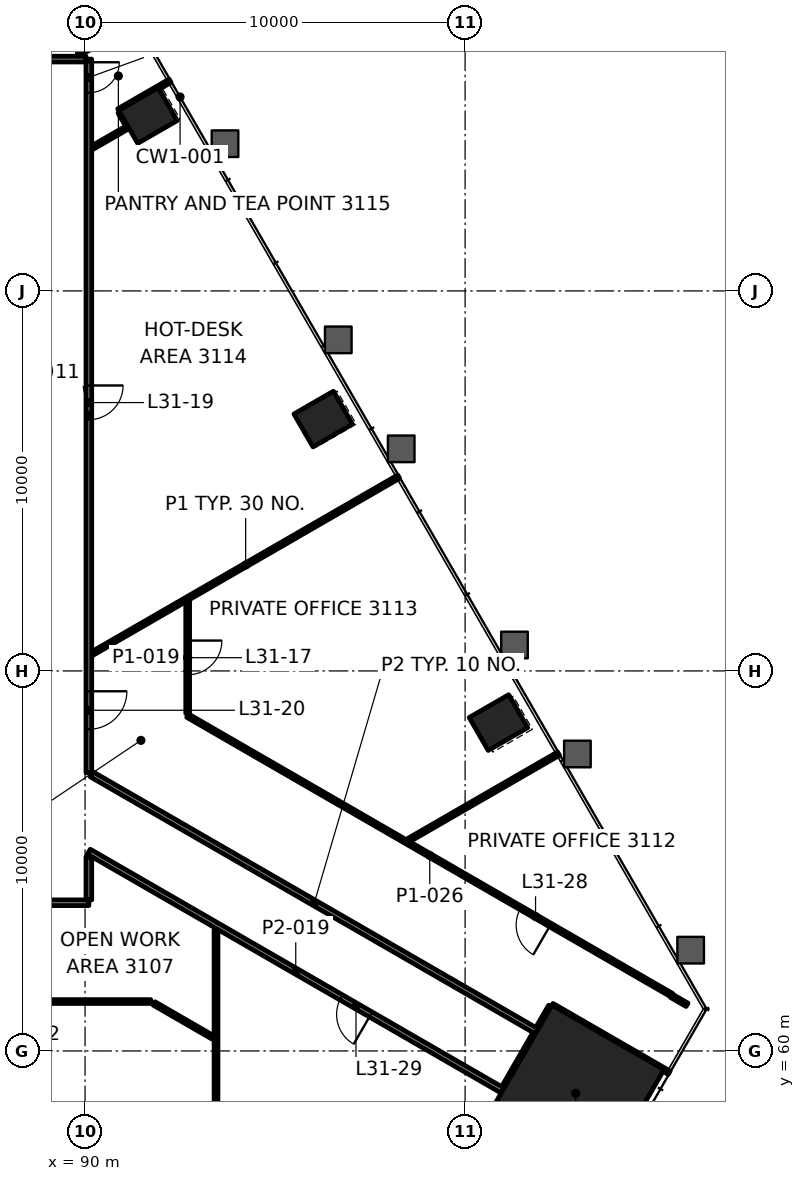
"""IFC4 building model, lengths in metres.
Left out: names, types, materials, properties, quantities, classifications, styles, units other than length and angle.
Written with IfcOpenShell. Run it as: python <this file> out.ifc"""

import sys

from ifc_helpers import new_model, si_unit, direction, frame, frame_2d, origin, origin_2d, place, context, subcontext, project, spatial, rectangle, extrude, element, fill, save


model = new_model("IFC4")
c1 = context("Model", 3, precision=1e-05, world=origin(), true_north=direction((0.0, 1.0)))
c2 = subcontext(c1, "Body", "Model", "MODEL_VIEW")
j1 = project(units=[si_unit("LENGTHUNIT", "METRE"), si_unit("PLANEANGLEUNIT", "RADIAN")], contexts=[c1])
p1 = place(None, origin())
s1 = spatial("IfcSite", under=j1, at=p1, CompositionType="ELEMENT")
p2 = place(p1, origin())
s2 = spatial("IfcBuilding", under=s1, at=p2, CompositionType="ELEMENT")
p3 = place(p2, frame((0.0, 0.0, 136.6)))
s3 = spatial("IfcBuildingStorey", under=s2, at=p3, CompositionType="ELEMENT", Elevation=136.6)
p4 = place(p3, frame((102.911, 58.886, 0.0), z_axis=(0.0, 0.0, 1.0), x_axis=(0.5, 0.866025403784, 0.0)))
e1 = element("IfcColumn", 1, at=p4, inside=s3, PredefinedType="COLUMN", context=c2, shape_type="SweptSolid", body=[
    extrude(rectangle(XDim=3.4, YDim=3.4, at=origin_2d()), origin(), (0.0, 0.0, 1.0), 4.2),
])
for number, where, z_axis, x_axis in (
    (2, (100.878, 68.641, -0.0), (0.0, 0.0, 1.0), (-0.5, 0.866, 0.0)),
    (3, (96.267, 76.628, -0.0), (0.0, 0.0, 1.0), (-0.5, 0.866, 0.0)),
    (4, (91.655, 84.616, -0.0), (0.0, 0.0, 1.0), (-0.5, 0.866, 0.0)),
):
    element("IfcColumn", number, at=place(p3, frame(where, z_axis=z_axis, x_axis=x_axis)), inside=s3, PredefinedType="COLUMN", context=c2, shape_type="SweptSolid", body=[
        extrude(rectangle(XDim=1.0, YDim=1.2, at=origin_2d()), origin(), (0.0, 0.0, 1.0), 4.2),
    ])
p5 = place(p3, frame((77.306, 61.3, 0.0), z_axis=(0.0, 0.0, 1.0), x_axis=(1.0, 0.0, 0.0)))
e5 = element("IfcWall", 5, at=p5, inside=s3, PredefinedType="PARTITIONING", context=c2, shape_type="SweptSolid", body=[
    extrude(rectangle(XDim=14.423, YDim=0.1, at=frame_2d((7.211, 0.0))), origin(), (0.0, 0.0, 1.0), 3.3),
])
p6 = place(p5, frame((3.687, 0.0, 0.0)))
e6 = element("IfcOpeningElement", 6, at=p6, cuts=e5, PredefinedType="OPENING", context=c2, shape_type="SweptSolid", body=[
    extrude(rectangle(XDim=0.9, YDim=2.1, at=frame_2d((0.45, 1.05))), frame((0.0, 0.06, 0.0), z_axis=(0.0, -1.0, 0.0), x_axis=(1.0, 0.0, 0.0)), (0.0, 0.0, 1.0), 0.12),
])
p7 = place(p5, frame((10.695, 0.0, 0.0)))
e7 = element("IfcOpeningElement", 7, at=p7, cuts=e5, PredefinedType="OPENING", context=c2, shape_type="SweptSolid", body=[
    extrude(rectangle(XDim=0.9, YDim=2.1, at=frame_2d((0.45, 1.05))), frame((0.0, 0.06, 0.0), z_axis=(0.0, -1.0, 0.0), x_axis=(1.0, 0.0, 0.0)), (0.0, 0.0, 1.0), 0.12),
])
p8 = place(p3, frame((90.1, 63.9, 0.0), z_axis=(0.0, 0.0, 1.0), x_axis=(-1.0, 0.0, 0.0)))
e8 = element("IfcWall", 8, at=p8, inside=s3, PredefinedType="PARTITIONING", context=c2, shape_type="SweptSolid", body=[
    extrude(rectangle(XDim=30.199, YDim=0.15, at=frame_2d((15.1, 0.0))), origin(), (0.0, 0.0, 1.0), 3.3),
])
p9 = place(p8, frame((5.999, 0.0, 0.0)))
e9 = element("IfcOpeningElement", 9, at=p9, cuts=e8, PredefinedType="OPENING", context=c2, shape_type="SweptSolid", body=[
    extrude(rectangle(XDim=1.0, YDim=2.1, at=frame_2d((0.5, 1.05))), frame((0.0, 0.085, 0.0), z_axis=(0.0, -1.0, 0.0), x_axis=(1.0, 0.0, 0.0)), (0.0, 0.0, 1.0), 0.17),
])
p10 = place(p8, frame((20.795, 0.0, 0.0)))
e10 = element("IfcOpeningElement", 10, at=p10, cuts=e8, PredefinedType="OPENING", context=c2, shape_type="SweptSolid", body=[
    extrude(rectangle(XDim=1.2, YDim=2.1, at=frame_2d((0.6, 1.05))), frame((0.0, 0.085, 0.0), z_axis=(0.0, -1.0, 0.0), x_axis=(1.0, 0.0, 0.0)), (0.0, 0.0, 1.0), 0.17),
])
p11 = place(p3, frame((80.375, 86.1, 0.0), z_axis=(0.0, 0.0, 1.0), x_axis=(1.0, 0.0, 0.0)))
e11 = element("IfcWall", 11, at=p11, inside=s3, PredefinedType="PARTITIONING", context=c2, shape_type="SweptSolid", body=[
    extrude(rectangle(XDim=9.65, YDim=0.15, at=frame_2d((4.825, 0.0))), origin(), (0.0, 0.0, 1.0), 3.3),
])
p12 = place(p11, frame((1.967, 0.0, 0.0)))
e12 = element("IfcOpeningElement", 12, at=p12, cuts=e11, PredefinedType="OPENING", context=c2, shape_type="SweptSolid", body=[
    extrude(rectangle(XDim=0.9, YDim=2.1, at=frame_2d((0.45, 1.05))), frame((0.0, 0.085, 0.0), z_axis=(0.0, -1.0, 0.0), x_axis=(1.0, 0.0, 0.0)), (0.0, 0.0, 1.0), 0.17),
])
p13 = place(p11, frame((6.485, 0.0, 0.0)))
e13 = element("IfcOpeningElement", 13, at=p13, cuts=e11, PredefinedType="OPENING", context=c2, shape_type="SweptSolid", body=[
    extrude(rectangle(XDim=0.9, YDim=2.1, at=frame_2d((0.45, 1.05))), frame((0.0, 0.085, 0.0), z_axis=(0.0, -1.0, 0.0), x_axis=(1.0, 0.0, 0.0)), (0.0, 0.0, 1.0), 0.17),
])
p14 = place(p3, frame((98.52, 65.55, 0.0), z_axis=(0.0, 0.0, 1.0), x_axis=(0.866021092682, 0.500007466975, 0.0)))
e14 = element("IfcWall", 14, at=p14, inside=s3, PredefinedType="PARTITIONING", context=c2, shape_type="SweptSolid", body=[
    extrude(rectangle(XDim=4.548, YDim=0.1, at=frame_2d((2.274, 0.0))), origin(), (0.0, 0.0, 1.0), 3.3),
])
p15 = place(p3, frame((90.201, 70.464, 0.0), z_axis=(0.0, 0.0, 1.0), x_axis=(0.8660316334, 0.499989209833, 0.0)))
e15 = element("IfcWall", 15, at=p15, inside=s3, PredefinedType="PARTITIONING", context=c2, shape_type="SweptSolid", body=[
    extrude(rectangle(XDim=9.296, YDim=0.1, at=frame_2d((4.648, 0.0))), origin(), (0.0, 0.0, 1.0), 3.065),
])
p16 = place(p3, frame((90.201, 83.776, 0.0), z_axis=(0.0, 0.0, 1.0), x_axis=(0.866034889475, 0.499983569942, 0.0)))
e16 = element("IfcWall", 16, at=p16, inside=s3, PredefinedType="PARTITIONING", context=c2, shape_type="SweptSolid", body=[
    extrude(rectangle(XDim=1.079, YDim=0.1, at=frame_2d((0.54, 0.0))), origin(), (0.0, 0.0, 1.0), 3.3),
])
p17 = place(p3, frame((90.885, 84.749, 0.0), z_axis=(0.0, 0.0, 1.0), x_axis=(0.866029224906, 0.499993381564, 0.0)))
e17 = element("IfcWall", 17, at=p17, inside=s3, PredefinedType="PARTITIONING", context=c2, shape_type="SweptSolid", body=[
    extrude(rectangle(XDim=1.56, YDim=0.1, at=frame_2d((0.78, 0.0))), origin(), (0.0, 0.0, 1.0), 3.065),
])
p18 = place(p3, frame((89.822, 86.22, 0.0), z_axis=(0.0, 0.0, 1.0), x_axis=(0.866022549299, 0.50000494408, 0.0)))
e18 = element("IfcWall", 18, at=p18, inside=s3, PredefinedType="PARTITIONING", context=c2, shape_type="SweptSolid", body=[
    extrude(rectangle(XDim=1.746, YDim=0.1, at=frame_2d((0.873, 0.0))), origin(), (0.0, 0.0, 1.0), 3.065),
])
p19 = place(p3, frame((85.211, 86.219, 0.0), z_axis=(0.0, 0.0, 1.0), x_axis=(0.866012033619, 0.50002315709, 0.0)))
e19 = element("IfcWall", 19, at=p19, inside=s3, PredefinedType="PARTITIONING", context=c2, shape_type="SweptSolid", body=[
    extrude(rectangle(XDim=5.74, YDim=0.1, at=frame_2d((2.87, 0.0))), origin(), (0.0, 0.0, 1.0), 3.065),
])
p20 = place(p3, frame((101.026, 59.022, 0.0), z_axis=(0.0, 0.0, 1.0), x_axis=(0.499991515992, 0.866030301974, 0.0)))
e20 = element("IfcWall", 20, at=p20, inside=s3, PredefinedType="PARTITIONING", context=c2, shape_type="SweptSolid", body=[
    extrude(rectangle(XDim=1.649, YDim=0.15, at=frame_2d((0.825, 0.0))), origin(), (0.0, 0.0, 1.0), 3.147),
])
p21 = place(p3, frame((93.446, 56.369, 0.0), z_axis=(0.0, 0.0, 1.0), x_axis=(0.0, 1.0, 0.0)))
e21 = element("IfcWall", 21, at=p21, inside=s3, PredefinedType="PARTITIONING", context=c2, shape_type="SweptSolid", body=[
    extrude(rectangle(XDim=6.825, YDim=0.1, at=frame_2d((3.413, 0.0))), origin(), (0.0, 0.0, 1.0), 3.3),
])
p22 = place(p3, frame((92.7, 71.818, 0.0), z_axis=(0.0, 0.0, 1.0), x_axis=(0.0, -1.0, 0.0)))
e22 = element("IfcWall", 22, at=p22, inside=s3, PredefinedType="PARTITIONING", context=c2, shape_type="SweptSolid", body=[
    extrude(rectangle(XDim=2.938, YDim=0.1, at=frame_2d((1.469, 0.0))), origin(), (0.0, 0.0, 1.0), 3.3),
])
p23 = place(p22, frame((1.019, 0.0, 0.0)))
e23 = element("IfcOpeningElement", 23, at=p23, cuts=e22, PredefinedType="OPENING", context=c2, shape_type="SweptSolid", body=[
    extrude(rectangle(XDim=0.9, YDim=2.1, at=frame_2d((0.45, 1.05))), frame((0.0, 0.06, 0.0), z_axis=(0.0, -1.0, 0.0), x_axis=(1.0, 0.0, 0.0)), (0.0, 0.0, 1.0), 0.12),
])
p24 = place(p3, frame((90.1, 63.975, 0.0), z_axis=(0.0, 0.0, 1.0), x_axis=(0.0, 1.0, 0.0)))
e24 = element("IfcWall", 24, at=p24, inside=s3, PredefinedType="PARTITIONING", context=c2, shape_type="SweptSolid", body=[
    extrude(rectangle(XDim=1.131, YDim=0.15, at=frame_2d((0.565, 0.0))), origin(), (0.0, 0.0, 1.0), 3.147),
])
p25 = place(p3, frame((90.1, 86.1, 0.0), z_axis=(0.0, 0.0, 1.0), x_axis=(0.0, -1.0, 0.0)))
e25 = element("IfcWall", 25, at=p25, inside=s3, PredefinedType="PARTITIONING", context=c2, shape_type="SweptSolid", body=[
    extrude(rectangle(XDim=18.779, YDim=0.15, at=frame_2d((9.389, 0.0))), origin(), (0.0, 0.0, 1.0), 3.3),
])
p26 = place(p25, frame((0.083, 0.0, 0.0)))
e26 = element("IfcOpeningElement", 26, at=p26, cuts=e25, PredefinedType="OPENING", context=c2, shape_type="SweptSolid", body=[
    extrude(rectangle(XDim=0.8, YDim=2.1, at=frame_2d((0.4, 1.05))), frame((0.0, 0.085, 0.0), z_axis=(0.0, -1.0, 0.0), x_axis=(1.0, 0.0, 0.0)), (0.0, 0.0, 1.0), 0.17),
])
p27 = place(p25, frame((8.588, 0.0, 0.0)))
e27 = element("IfcOpeningElement", 27, at=p27, cuts=e25, PredefinedType="OPENING", context=c2, shape_type="SweptSolid", body=[
    extrude(rectangle(XDim=0.9, YDim=2.1, at=frame_2d((0.45, 1.05))), frame((0.0, 0.085, 0.0), z_axis=(0.0, -1.0, 0.0), x_axis=(1.0, 0.0, 0.0)), (0.0, 0.0, 1.0), 0.17),
])
p28 = place(p25, frame((16.635, 0.0, 0.0)))
e28 = element("IfcOpeningElement", 28, at=p28, cuts=e25, PredefinedType="OPENING", context=c2, shape_type="SweptSolid", body=[
    extrude(rectangle(XDim=1.0, YDim=2.1, at=frame_2d((0.5, 1.05))), frame((0.0, 0.085, 0.0), z_axis=(0.0, -1.0, 0.0), x_axis=(1.0, 0.0, 0.0)), (0.0, 0.0, 1.0), 0.17),
])
p29 = place(p3, frame((91.106, 84.368, 0.0), z_axis=(0.0, 0.0, 1.0), x_axis=(-0.499975232926, 0.866039702589, 0.0)))
e29 = element("IfcWall", 29, at=p29, inside=s3, PredefinedType="PARTITIONING", context=c2, shape_type="SweptSolid", body=[
    extrude(rectangle(XDim=0.39, YDim=0.1, at=frame_2d((0.195, 0.0))), origin(), (0.0, 0.0, 1.0), 3.3),
])
p30 = place(p3, frame((105.439, 61.467, 0.0), z_axis=(0.0, 0.0, 1.0), x_axis=(-0.866023351286, 0.500003555014, 0.0)))
e30 = element("IfcWall", 30, at=p30, inside=s3, PredefinedType="PARTITIONING", context=c2, shape_type="SweptSolid", body=[
    extrude(rectangle(XDim=14.71, YDim=0.1, at=frame_2d((7.355, 0.0))), origin(), (0.0, 0.0, 1.0), 3.3),
])
p31 = place(p30, frame((3.69, 0.0, 0.0)))
e31 = element("IfcOpeningElement", 31, at=p31, cuts=e30, PredefinedType="OPENING", context=c2, shape_type="SweptSolid", body=[
    extrude(rectangle(XDim=0.9, YDim=2.1, at=frame_2d((0.45, 1.05))), frame((0.0, 0.06, 0.0), z_axis=(0.0, -1.0, 0.0), x_axis=(1.0, 0.0, 0.0)), (0.0, 0.0, 1.0), 0.12),
])
p32 = place(p3, frame((105.84, 61.214, 0.0), z_axis=(0.0, 0.0, 1.0), x_axis=(-0.866108284413, 0.499856419056, 0.0)))
e32 = element("IfcWall", 32, at=p32, inside=s3, PredefinedType="PARTITIONING", context=c2, shape_type="SweptSolid", body=[
    extrude(rectangle(XDim=0.473, YDim=0.1, at=frame_2d((0.237, 0.0))), origin(), (0.0, 0.0, 1.0), 3.3),
])
p33 = place(p3, frame((105.371, 59.427, 0.0), z_axis=(0.0, 0.0, 1.0), x_axis=(-0.866014251095, 0.500019316528, 0.0)))
e33 = element("IfcWall", 33, at=p33, inside=s3, PredefinedType="PARTITIONING", context=c2, shape_type="SweptSolid", body=[
    extrude(rectangle(XDim=3.559, YDim=0.1, at=frame_2d((1.78, 0.0))), origin(), (0.0, 0.0, 1.0), 3.3),
])
p34 = place(p3, frame((101.888, 60.515, 0.0), z_axis=(0.0, 0.0, 1.0), x_axis=(-0.866026273051, 0.499998494383, 0.0)))
e34 = element("IfcWall", 34, at=p34, inside=s3, PredefinedType="PARTITIONING", context=c2, shape_type="SweptSolid", body=[
    extrude(rectangle(XDim=13.525, YDim=0.15, at=frame_2d((6.763, 0.0))), origin(), (0.0, 0.0, 1.0), 3.3),
])
p35 = place(p3, frame((100.988, 58.957, 0.0), z_axis=(0.0, 0.0, 1.0), x_axis=(-0.866021305353, 0.500007098624, 0.0)))
e35 = element("IfcWall", 35, at=p35, inside=s3, PredefinedType="PARTITIONING", context=c2, shape_type="SweptSolid", body=[
    extrude(rectangle(XDim=12.572, YDim=0.15, at=frame_2d((6.286, 0.0))), origin(), (0.0, 0.0, 1.0), 3.147),
])
p36 = place(p35, frame((4.006, 0.0, 0.0)))
e36 = element("IfcOpeningElement", 36, at=p36, cuts=e35, PredefinedType="OPENING", context=c2, shape_type="SweptSolid", body=[
    extrude(rectangle(XDim=0.9, YDim=2.1, at=frame_2d((0.45, 1.05))), frame((0.0, 0.085, 0.0), z_axis=(0.0, -1.0, 0.0), x_axis=(1.0, 0.0, 0.0)), (0.0, 0.0, 1.0), 0.17),
])
p37 = place(p3, frame((93.37, 60.353, 0.0), z_axis=(0.0, 0.0, 1.0), x_axis=(-0.866058764138, 0.49994221372, 0.0)))
e37 = element("IfcWall", 37, at=p37, inside=s3, PredefinedType="PARTITIONING", context=c2, shape_type="SweptSolid", body=[
    extrude(rectangle(XDim=1.795, YDim=0.1, at=frame_2d((0.897, 0.0))), origin(), (0.0, 0.0, 1.0), 3.3),
])
p38 = place(p3, frame((101.926, 60.58, 0.0), z_axis=(0.0, 0.0, 1.0), x_axis=(0.50015088144, 0.865938274818, 0.0)))
e38 = element("IfcWall", 38, at=p38, inside=s3, PredefinedType="PARTITIONING", context=c2, shape_type="SweptSolid", body=[
    extrude(rectangle(XDim=0.674, YDim=0.15, at=frame_2d((0.337, 0.0))), origin(), (0.0, 0.0, 1.0), 3.3),
])
p39 = place(p23, origin())
e39 = element("IfcDoor", 39, at=p39, inside=s3, OperationType="SINGLE_SWING_LEFT", PredefinedType="DOOR", context=c2, shape_type="SweptSolid", body=[
    extrude(rectangle(XDim=0.9, YDim=2.1, at=frame_2d((0.45, 1.05))), frame((0.0, 0.025, 0.0), z_axis=(0.0, -1.0, 0.0), x_axis=(1.0, 0.0, 0.0)), (0.0, 0.0, 1.0), 0.05),
])
fill(e23, e39)
p40 = place(p26, origin())
e40 = element("IfcDoor", 40, at=p40, inside=s3, OperationType="SINGLE_SWING_LEFT", PredefinedType="DOOR", context=c2, shape_type="SweptSolid", body=[
    extrude(rectangle(XDim=0.8, YDim=2.1, at=frame_2d((0.4, 1.05))), frame((0.0, 0.025, 0.0), z_axis=(0.0, -1.0, 0.0), x_axis=(1.0, 0.0, 0.0)), (0.0, 0.0, 1.0), 0.05),
])
fill(e26, e40)
p41 = place(p27, origin())
e41 = element("IfcDoor", 41, at=p41, inside=s3, OperationType="SINGLE_SWING_RIGHT", PredefinedType="DOOR", context=c2, shape_type="SweptSolid", body=[
    extrude(rectangle(XDim=0.9, YDim=2.1, at=frame_2d((0.45, 1.05))), frame((0.0, 0.025, 0.0), z_axis=(0.0, -1.0, 0.0), x_axis=(1.0, 0.0, 0.0)), (0.0, 0.0, 1.0), 0.05),
])
fill(e27, e41)
p42 = place(p28, origin())
e42 = element("IfcDoor", 42, at=p42, inside=s3, OperationType="SINGLE_SWING_LEFT", PredefinedType="DOOR", context=c2, shape_type="SweptSolid", body=[
    extrude(rectangle(XDim=1.0, YDim=2.1, at=frame_2d((0.5, 1.05))), frame((0.0, 0.025, 0.0), z_axis=(0.0, -1.0, 0.0), x_axis=(1.0, 0.0, 0.0)), (0.0, 0.0, 1.0), 0.05),
])
fill(e28, e42)
p43 = place(p31, origin())
e43 = element("IfcDoor", 43, at=p43, inside=s3, OperationType="SINGLE_SWING_LEFT", PredefinedType="DOOR", context=c2, shape_type="SweptSolid", body=[
    extrude(rectangle(XDim=0.9, YDim=2.1, at=frame_2d((0.45, 1.05))), frame((0.0, 0.025, 0.0), z_axis=(0.0, -1.0, 0.0), x_axis=(1.0, 0.0, 0.0)), (0.0, 0.0, 1.0), 0.05),
])
fill(e31, e43)
p44 = place(p36, origin())
e44 = element("IfcDoor", 44, at=p44, inside=s3, OperationType="SINGLE_SWING_LEFT", PredefinedType="DOOR", context=c2, shape_type="SweptSolid", body=[
    extrude(rectangle(XDim=0.9, YDim=2.1, at=frame_2d((0.45, 1.05))), frame((0.0, 0.025, 0.0), z_axis=(0.0, -1.0, 0.0), x_axis=(1.0, 0.0, 0.0)), (0.0, 0.0, 1.0), 0.05),
])
fill(e36, e44)
save(model, sys.argv[1])
